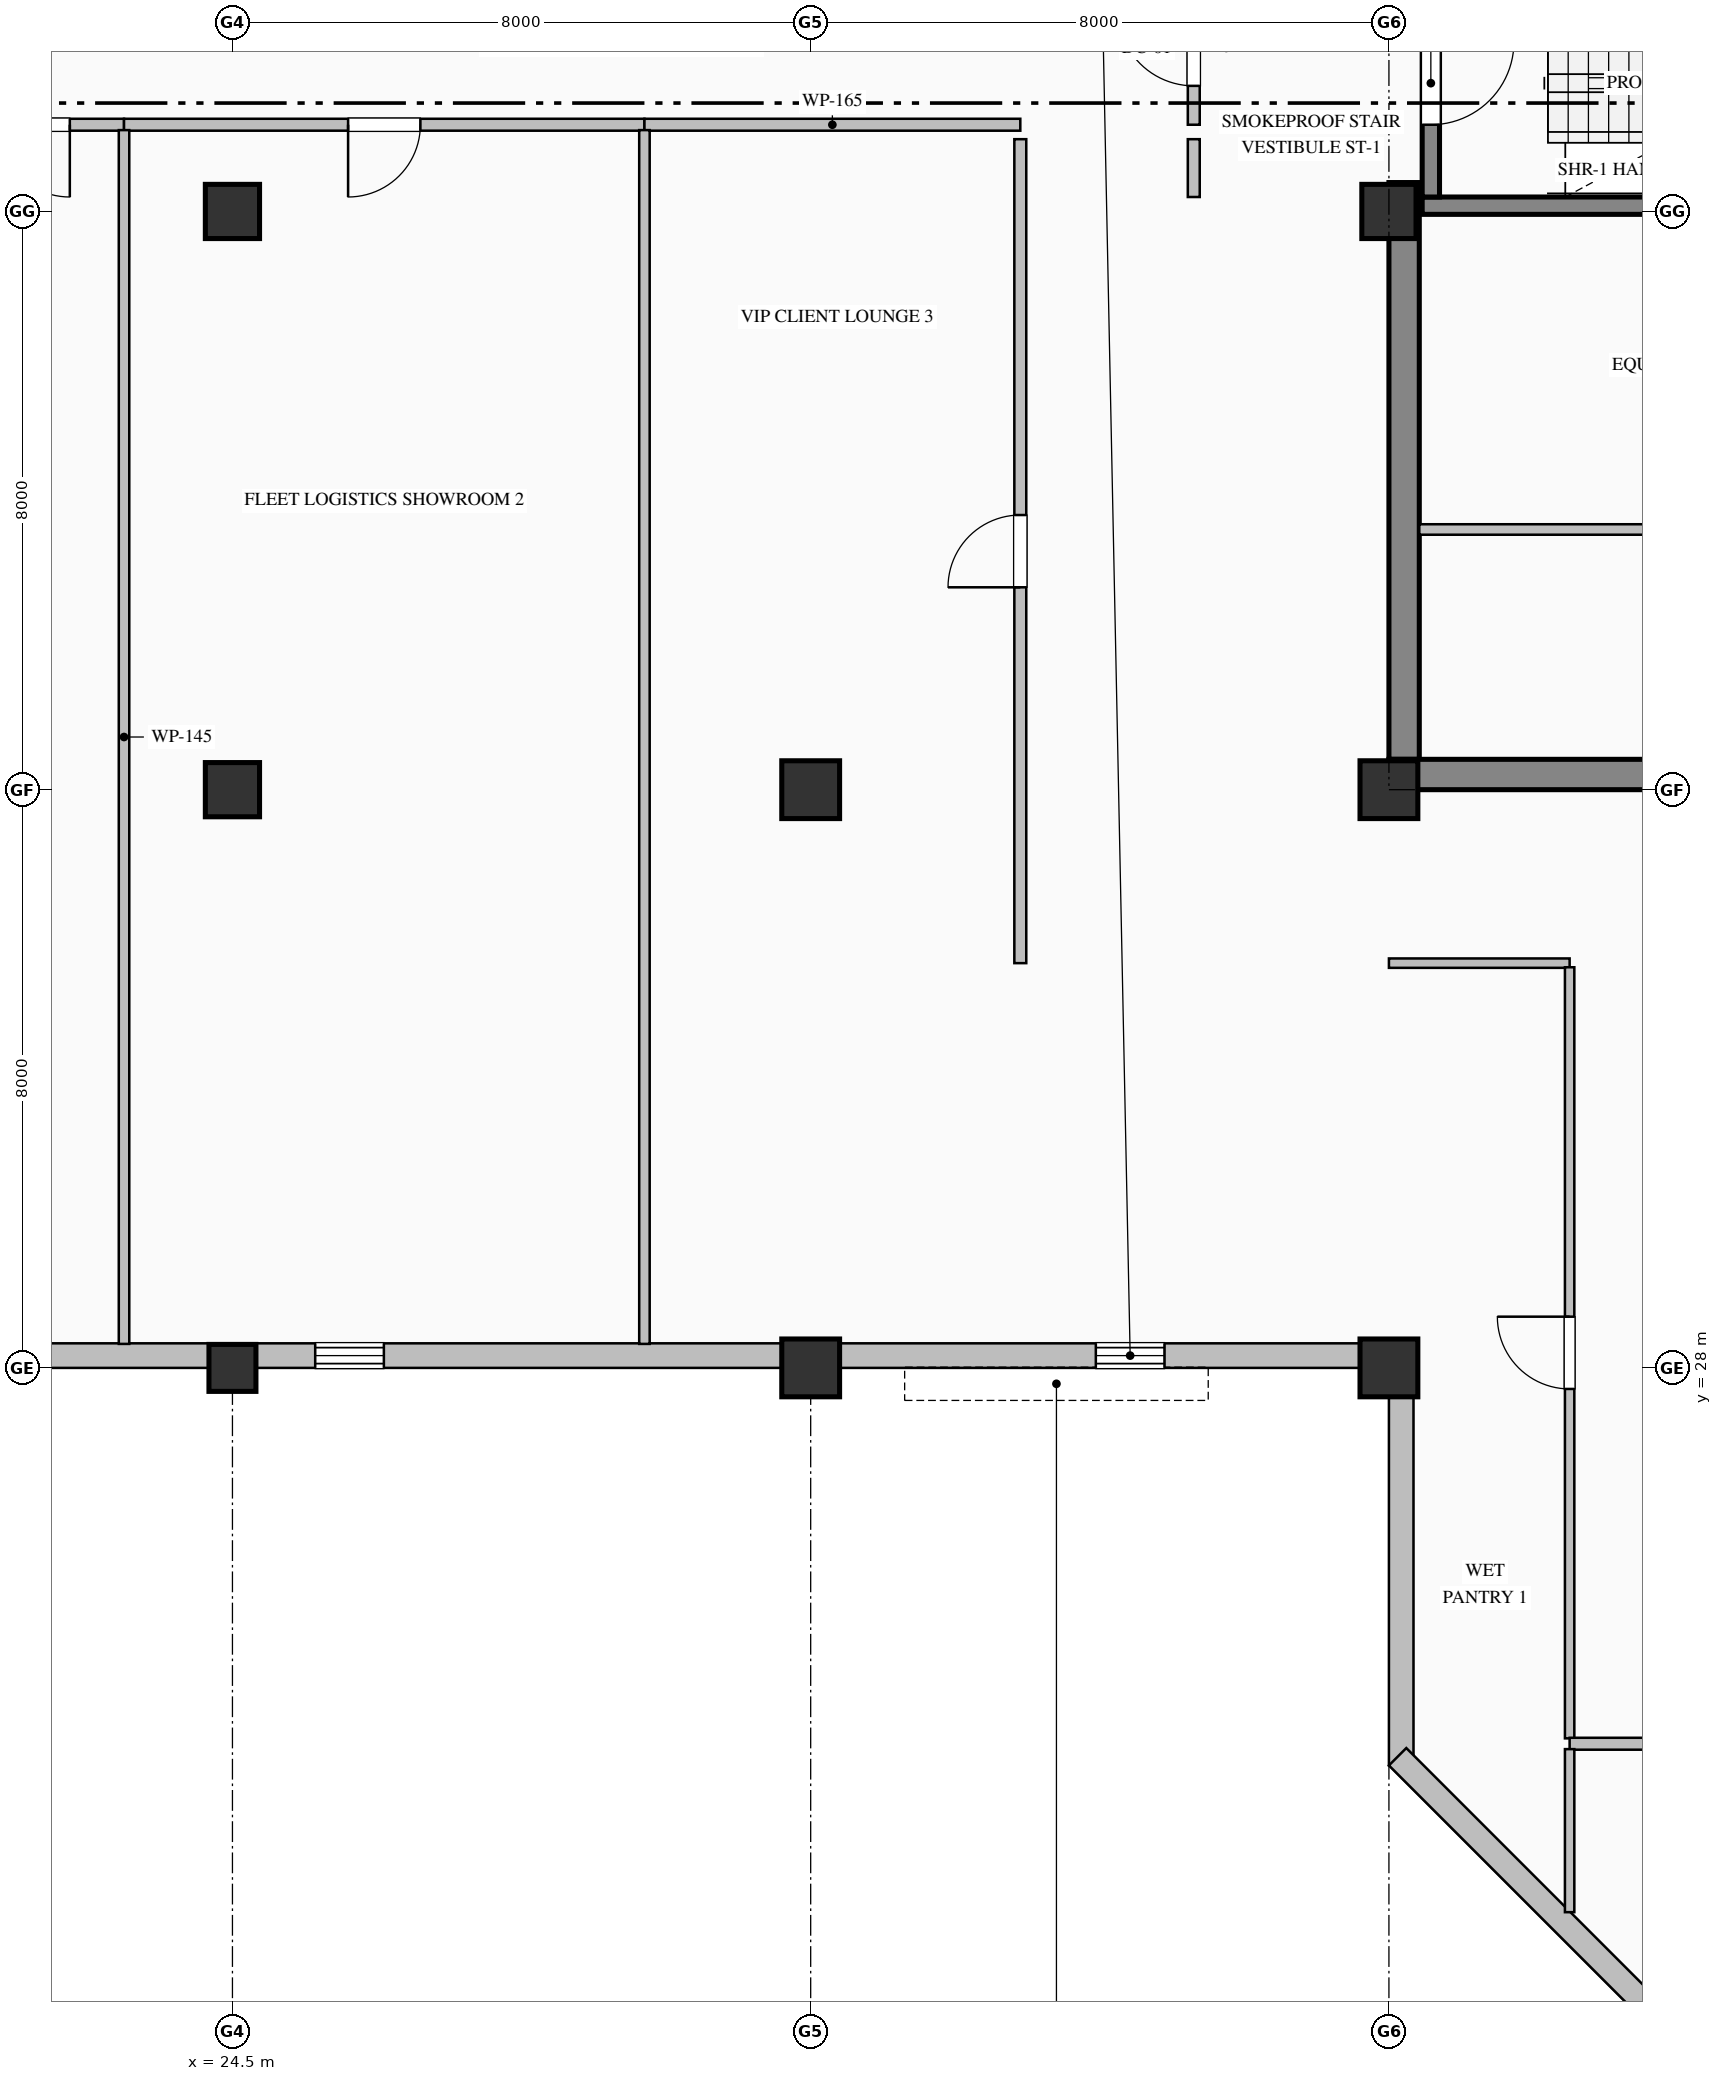
"""IFC4 building model, lengths in metres.
Left out: names, types, materials, properties, quantities, classifications, styles, units other than length and angle.
Written with IfcOpenShell. Run it as: python <this file> out.ifc"""

import sys

from ifc_helpers import new_model, si_unit, direction, frame, frame_2d, origin, origin_2d, place, context, subcontext, project, spatial, rectangle, hollow_rectangle, extrude, element, fill, save


model = new_model("IFC4")
c1 = context("Model", 3, precision=1e-05, world=origin(), true_north=direction((0.0, 1.0)))
c2 = subcontext(c1, "Body", "Model", "MODEL_VIEW")
j1 = project(units=[si_unit("LENGTHUNIT", "METRE"), si_unit("PLANEANGLEUNIT", "RADIAN")], contexts=[c1])
p1 = place(None, origin())
s1 = spatial("IfcSite", under=j1, at=p1, CompositionType="ELEMENT")
p2 = place(p1, origin())
s2 = spatial("IfcBuilding", under=s1, at=p2, CompositionType="ELEMENT")
p3 = place(p2, frame((0.0, 0.0, 355.2)))
s3 = spatial("IfcBuildingStorey", under=s2, at=p3, CompositionType="ELEMENT", Elevation=355.2)
p4 = place(p3, frame((40.71, 36.42, 0.0), z_axis=(0.0, 0.0, 1.0), x_axis=(0.0, 1.0, 0.0)))
e1 = element("IfcWall", 1, at=p4, inside=s3, PredefinedType="SHEAR", context=c2, shape_type="SweptSolid", body=[
    extrude(rectangle(XDim=7.98, YDim=0.42, at=frame_2d((3.99, 0.0))), origin(), (0.0, 0.0, 1.0), 3.785),
])
p5 = place(p3, frame((40.5, 36.21, 0.0), z_axis=(0.0, 0.0, 1.0), x_axis=(1.0, 0.0, 0.0)))
e2 = element("IfcWall", 2, at=p5, inside=s3, PredefinedType="SHEAR", context=c2, shape_type="SweptSolid", body=[
    extrude(rectangle(XDim=9.1, YDim=0.42, at=frame_2d((4.55, 0.0))), origin(), (0.0, 0.0, 1.0), 3.785),
])
p6 = place(p3, frame((24.5, 28.0, 0.0), z_axis=(0.0, 0.0, 1.0), x_axis=(1.0, 0.0, 0.0)))
e3 = element("IfcColumn", 3, at=p6, inside=s3, PredefinedType="COLUMN", context=c2, shape_type="SweptSolid", body=[
    extrude(hollow_rectangle(XDim=0.65, YDim=0.65, WallThickness=0.028, at=origin_2d()), origin(), (0.0, 0.0, 1.0), 4.0),
])
for number, where, z_axis, x_axis in (
    (4, (24.5, 36.0, 0.0), (0.0, 0.0, 1.0), (1.0, 0.0, 0.0)),
    (5, (24.5, 44.0, 0.0), (0.0, 0.0, 1.0), (1.0, 0.0, 0.0)),
):
    element("IfcColumn", number, at=place(p3, frame(where, z_axis=z_axis, x_axis=x_axis)), inside=s3, PredefinedType="COLUMN", context=c2, shape_type="SweptSolid", body=[
        extrude(rectangle(XDim=0.75, YDim=0.75, at=origin_2d()), origin(), (0.0, 0.0, 1.0), 4.0),
    ])
for number, where, z_axis, x_axis in (
    (6, (32.5, 28.0, 0.0), (0.0, 0.0, 1.0), (1.0, 0.0, 0.0)),
    (7, (32.5, 36.0, 0.0), (0.0, 0.0, 1.0), (1.0, 0.0, 0.0)),
    (8, (40.5, 28.0, 0.0), (0.0, 0.0, 1.0), (1.0, 0.0, 0.0)),
    (9, (40.5, 36.0, 0.0), (0.0, 0.0, 1.0), (1.0, 0.0, 0.0)),
):
    element("IfcColumn", number, at=place(p3, frame(where, z_axis=z_axis, x_axis=x_axis)), inside=s3, PredefinedType="COLUMN", context=c2, shape_type="SweptSolid", body=[
        extrude(hollow_rectangle(XDim=0.8, YDim=0.8, WallThickness=0.032, at=origin_2d()), origin(), (0.0, 0.0, 1.0), 4.0),
    ])
p7 = place(p3, frame((40.5, 44.0, 0.0), z_axis=(0.0, 0.0, 1.0), x_axis=(1.0, 0.0, 0.0)))
e10 = element("IfcColumn", 10, at=p7, inside=s3, PredefinedType="COLUMN", context=c2, shape_type="SweptSolid", body=[
    extrude(rectangle(XDim=0.75, YDim=0.75, at=origin_2d()), origin(), (0.0, 0.0, 1.0), 4.0),
])
p8 = place(p3, frame((40.67, 22.5, 0.0), z_axis=(0.0, 0.0, 1.0), x_axis=(0.0, 1.0, 0.0)))
e11 = element("IfcWall", 11, at=p8, inside=s3, PredefinedType="SOLIDWALL", context=c2, shape_type="SweptSolid", body=[
    extrude(rectangle(XDim=5.84, YDim=0.34, at=frame_2d((2.92, 0.0))), origin(), (0.0, 0.0, 1.0), 3.185),
])
p9 = place(p3, frame((40.52, 28.17, 0.0), z_axis=(0.0, 0.0, 1.0), x_axis=(-1.0, 0.0, 0.0)))
e12 = element("IfcWall", 12, at=p9, inside=s3, PredefinedType="SOLIDWALL", context=c2, shape_type="SweptSolid", body=[
    extrude(rectangle(XDim=20.02, YDim=0.34, at=frame_2d((10.01, 0.0))), origin(), (0.0, 0.0, 1.0), 3.185),
])
p10 = place(p9, frame((3.125, 0.0, 0.9)))
e13 = element("IfcOpeningElement", 13, at=p10, cuts=e12, PredefinedType="OPENING", context=c2, shape_type="SweptSolid", body=[
    extrude(rectangle(XDim=0.95, YDim=1.85, at=frame_2d((0.475, 0.925))), frame((0.0, 0.18, 0.0), z_axis=(0.0, -1.0, 0.0), x_axis=(1.0, 0.0, 0.0)), (0.0, 0.0, 1.0), 0.36),
])
p11 = place(p9, frame((13.925, 0.0, 0.9)))
e14 = element("IfcOpeningElement", 14, at=p11, cuts=e12, PredefinedType="OPENING", context=c2, shape_type="SweptSolid", body=[
    extrude(rectangle(XDim=0.95, YDim=1.85, at=frame_2d((0.475, 0.925))), frame((0.0, 0.18, 0.0), z_axis=(0.0, -1.0, 0.0), x_axis=(1.0, 0.0, 0.0)), (0.0, 0.0, 1.0), 0.36),
])
p12 = place(p3, frame((44.62, 18.62, 0.0), z_axis=(0.0, 0.0, 1.0), x_axis=(-0.707106781187, 0.707106781187, 0.0)))
e15 = element("IfcWall", 15, at=p12, inside=s3, PredefinedType="SOLIDWALL", context=c2, shape_type="SweptSolid", body=[
    extrude(rectangle(XDim=5.657, YDim=0.34, at=frame_2d((2.828, 0.0))), origin(), (0.0, 0.0, 1.0), 3.785),
])
p13 = place(p3, frame((49.04, 44.08, 0.0), z_axis=(0.0, 0.0, 1.0), x_axis=(-1.0, 0.0, 0.0)))
e16 = element("IfcWall", 16, at=p13, inside=s3, PredefinedType="SOLIDWALL", context=c2, shape_type="SweptSolid", body=[
    extrude(rectangle(XDim=8.08, YDim=0.24, at=frame_2d((4.04, 0.0))), origin(), (0.0, 0.0, 1.0), 4.0),
])
p14 = place(p3, frame((41.08, 47.35, 0.0), z_axis=(0.0, 0.0, 1.0), x_axis=(0.0, -1.0, 0.0)))
e17 = element("IfcWall", 17, at=p14, inside=s3, PredefinedType="SOLIDWALL", context=c2, shape_type="SweptSolid", body=[
    extrude(rectangle(XDim=3.15, YDim=0.24, at=frame_2d((1.575, 0.0))), origin(), (0.0, 0.0, 1.0), 4.0),
])
p15 = place(p14, frame((1.0, 0.0, 0.0)))
e18 = element("IfcOpeningElement", 18, at=p15, cuts=e17, PredefinedType="OPENING", context=c2, shape_type="SweptSolid", body=[
    extrude(rectangle(XDim=1.15, YDim=2.2, at=frame_2d((0.575, 1.1))), frame((0.0, 0.13, 0.0), z_axis=(0.0, -1.0, 0.0), x_axis=(1.0, 0.0, 0.0)), (0.0, 0.0, 1.0), 0.26),
])
p16 = place(p3, frame((37.8, 45.2, 0.0), z_axis=(0.0, 0.0, 1.0), x_axis=(0.0, 1.0, 0.0)))
e19 = element("IfcWall", 19, at=p16, inside=s3, PredefinedType="PARTITIONING", context=c2, shape_type="SweptSolid", body=[
    extrude(rectangle(XDim=2.125, YDim=0.165, at=frame_2d((1.063, 0.0))), origin(), (0.0, 0.0, 1.0), 3.785),
])
p17 = place(p16, frame((0.538, 0.0, 0.0)))
e20 = element("IfcOpeningElement", 20, at=p17, cuts=e19, PredefinedType="OPENING", context=c2, shape_type="SweptSolid", body=[
    extrude(rectangle(XDim=1.05, YDim=2.15, at=frame_2d((0.525, 1.075))), frame((0.0, 0.093, 0.0), z_axis=(0.0, -1.0, 0.0), x_axis=(1.0, 0.0, 0.0)), (0.0, 0.0, 1.0), 0.185),
])
p18 = place(p3, frame((37.8, 44.2, 0.0), z_axis=(0.0, 0.0, 1.0), x_axis=(0.0, 1.0, 0.0)))
e21 = element("IfcWall", 21, at=p18, inside=s3, PredefinedType="PARTITIONING", context=c2, shape_type="SweptSolid", body=[
    extrude(rectangle(XDim=0.8, YDim=0.165, at=frame_2d((0.4, 0.0))), origin(), (0.0, 0.0, 1.0), 3.785),
])
p19 = place(p3, frame((40.92, 39.6, 0.0), z_axis=(0.0, 0.0, 1.0), x_axis=(1.0, 0.0, 0.0)))
e22 = element("IfcWall", 22, at=p19, inside=s3, PredefinedType="PARTITIONING", context=c2, shape_type="SweptSolid", body=[
    extrude(rectangle(XDim=8.48, YDim=0.145, at=frame_2d((4.24, 0.0))), origin(), (0.0, 0.0, 1.0), 3.785),
])
p20 = place(p3, frame((23.0, 45.2, 0.0), z_axis=(0.0, 0.0, 1.0), x_axis=(-1.0, 0.0, 0.0)))
e23 = element("IfcWall", 23, at=p20, inside=s3, PredefinedType="PARTITIONING", context=c2, shape_type="SweptSolid", body=[
    extrude(rectangle(XDim=2.5, YDim=0.165, at=frame_2d((1.25, 0.0))), origin(), (0.0, 0.0, 1.0), 3.785),
])
p21 = place(p20, frame((0.75, 0.0, 0.0)))
e24 = element("IfcOpeningElement", 24, at=p21, cuts=e23, PredefinedType="OPENING", context=c2, shape_type="SweptSolid", body=[
    extrude(rectangle(XDim=1.0, YDim=2.15, at=frame_2d((0.5, 1.075))), frame((0.0, 0.093, 0.0), z_axis=(0.0, -1.0, 0.0), x_axis=(1.0, 0.0, 0.0)), (0.0, 0.0, 1.0), 0.185),
])
p22 = place(p3, frame((30.2, 45.2, 0.0), z_axis=(0.0, 0.0, 1.0), x_axis=(-1.0, 0.0, 0.0)))
e25 = element("IfcWall", 25, at=p22, inside=s3, PredefinedType="PARTITIONING", context=c2, shape_type="SweptSolid", body=[
    extrude(rectangle(XDim=7.2, YDim=0.165, at=frame_2d((3.6, 0.0))), origin(), (0.0, 0.0, 1.0), 3.785),
])
p23 = place(p22, frame((3.1, 0.0, 0.0)))
e26 = element("IfcOpeningElement", 26, at=p23, cuts=e25, PredefinedType="OPENING", context=c2, shape_type="SweptSolid", body=[
    extrude(rectangle(XDim=1.0, YDim=2.15, at=frame_2d((0.5, 1.075))), frame((0.0, 0.093, 0.0), z_axis=(0.0, -1.0, 0.0), x_axis=(1.0, 0.0, 0.0)), (0.0, 0.0, 1.0), 0.185),
])
p24 = place(p3, frame((35.4, 45.2, 0.0), z_axis=(0.0, 0.0, 1.0), x_axis=(-1.0, 0.0, 0.0)))
e27 = element("IfcWall", 27, at=p24, inside=s3, PredefinedType="PARTITIONING", context=c2, shape_type="SweptSolid", body=[
    extrude(rectangle(XDim=5.2, YDim=0.165, at=frame_2d((2.6, 0.0))), origin(), (0.0, 0.0, 1.0), 3.785),
])
p25 = place(p3, frame((35.4, 33.6, 0.0), z_axis=(0.0, 0.0, 1.0), x_axis=(0.0, 1.0, 0.0)))
e28 = element("IfcWall", 28, at=p25, inside=s3, PredefinedType="PARTITIONING", context=c2, shape_type="SweptSolid", body=[
    extrude(rectangle(XDim=11.4, YDim=0.165, at=frame_2d((5.7, 0.0))), origin(), (0.0, 0.0, 1.0), 3.785),
])
p26 = place(p25, frame((5.2, 0.0, 0.0)))
e29 = element("IfcOpeningElement", 29, at=p26, cuts=e28, PredefinedType="OPENING", context=c2, shape_type="SweptSolid", body=[
    extrude(rectangle(XDim=1.0, YDim=2.15, at=frame_2d((0.5, 1.075))), frame((0.0, 0.093, 0.0), z_axis=(0.0, -1.0, 0.0), x_axis=(1.0, 0.0, 0.0)), (0.0, 0.0, 1.0), 0.185),
])
p27 = place(p3, frame((43.0, 33.6, 0.0), z_axis=(0.0, 0.0, 1.0), x_axis=(-1.0, 0.0, 0.0)))
e30 = element("IfcWall", 30, at=p27, inside=s3, PredefinedType="PARTITIONING", context=c2, shape_type="SweptSolid", body=[
    extrude(rectangle(XDim=2.5, YDim=0.13, at=frame_2d((1.25, 0.0))), origin(), (0.0, 0.0, 1.0), 3.785),
])
p28 = place(p3, frame((43.0, 22.875, 0.0), z_axis=(0.0, 0.0, 1.0), x_axis=(0.0, 1.0, 0.0)))
e31 = element("IfcWall", 31, at=p28, inside=s3, PredefinedType="PARTITIONING", context=c2, shape_type="SweptSolid", body=[
    extrude(rectangle(XDim=10.668, YDim=0.13, at=frame_2d((5.334, 0.0))), origin(), (0.0, 0.0, 1.0), 3.785),
])
p29 = place(p28, frame((4.834, 0.0, 0.0)))
e32 = element("IfcOpeningElement", 32, at=p29, cuts=e31, PredefinedType="OPENING", context=c2, shape_type="SweptSolid", body=[
    extrude(rectangle(XDim=1.0, YDim=2.15, at=frame_2d((0.5, 1.075))), frame((0.0, 0.075, 0.0), z_axis=(0.0, -1.0, 0.0), x_axis=(1.0, 0.0, 0.0)), (0.0, 0.0, 1.0), 0.15),
])
p30 = place(p3, frame((45.2, 22.8, 0.0), z_axis=(0.0, 0.0, 1.0), x_axis=(-1.0, 0.0, 0.0)))
e33 = element("IfcWall", 33, at=p30, inside=s3, PredefinedType="PARTITIONING", context=c2, shape_type="SweptSolid", body=[
    extrude(rectangle(XDim=2.2, YDim=0.165, at=frame_2d((1.1, 0.0))), origin(), (0.0, 0.0, 1.0), 3.785),
])
for number, where, z_axis, x_axis in (
    (34, (23.0, 45.125, 0.0), (0.0, 0.0, 1.0), (0.0, -1.0, 0.0)),
    (35, (30.2, 45.125, 0.0), (0.0, 0.0, 1.0), (0.0, -1.0, 0.0)),
):
    element("IfcWall", number, at=place(p3, frame(where, z_axis=z_axis, x_axis=x_axis)), inside=s3, PredefinedType="PARTITIONING", context=c2, shape_type="SweptSolid", body=[
        extrude(rectangle(XDim=16.793, YDim=0.145, at=frame_2d((8.397, 0.0))), origin(), (0.0, 0.0, 1.0), 3.785),
    ])
p31 = place(p3, frame((43.0, 22.726, 0.0), z_axis=(0.0, 0.0, 1.0), x_axis=(0.0, -1.0, 0.0)))
e36 = element("IfcWall", 36, at=p31, inside=s3, PredefinedType="PARTITIONING", context=c2, shape_type="SweptSolid", body=[
    extrude(rectangle(XDim=2.256, YDim=0.13, at=frame_2d((1.128, 0.0))), origin(), (0.0, 0.0, 1.0), 3.785),
])
p32 = place(p10, origin())
e37 = element("IfcWindow", 37, at=p32, inside=s3, PartitioningType="SINGLE_PANEL", PredefinedType="WINDOW", context=c2, shape_type="SweptSolid", body=[
    extrude(rectangle(XDim=0.95, YDim=1.85, at=frame_2d((0.475, 0.925))), frame((0.0, 0.15, 0.0), z_axis=(0.0, -1.0, 0.0), x_axis=(1.0, 0.0, 0.0)), (0.0, 0.0, 1.0), 0.06),
])
fill(e13, e37)
p33 = place(p11, origin())
e38 = element("IfcWindow", 38, at=p33, inside=s3, PartitioningType="SINGLE_PANEL", PredefinedType="WINDOW", context=c2, shape_type="SweptSolid", body=[
    extrude(rectangle(XDim=0.95, YDim=1.85, at=frame_2d((0.475, 0.925))), frame((0.0, 0.15, 0.0), z_axis=(0.0, -1.0, 0.0), x_axis=(1.0, 0.0, 0.0)), (0.0, 0.0, 1.0), 0.06),
])
fill(e14, e38)
p34 = place(p15, origin())
e39 = element("IfcDoor", 39, at=p34, inside=s3, OperationType="SINGLE_SWING_LEFT", PredefinedType="DOOR", context=c2, shape_type="SweptSolid", body=[
    extrude(rectangle(XDim=1.15, YDim=2.2, at=frame_2d((0.575, 1.1))), frame((0.0, 0.025, 0.0), z_axis=(0.0, -1.0, 0.0), x_axis=(1.0, 0.0, 0.0)), (0.0, 0.0, 1.0), 0.05),
])
fill(e18, e39)
p35 = place(p17, origin())
e40 = element("IfcDoor", 40, at=p35, inside=s3, OperationType="SINGLE_SWING_RIGHT", PredefinedType="DOOR", context=c2, shape_type="SweptSolid", body=[
    extrude(rectangle(XDim=1.05, YDim=2.15, at=frame_2d((0.525, 1.075))), frame((0.0, 0.025, 0.0), z_axis=(0.0, -1.0, 0.0), x_axis=(1.0, 0.0, 0.0)), (0.0, 0.0, 1.0), 0.05),
])
fill(e20, e40)
p36 = place(p21, origin())
e41 = element("IfcDoor", 41, at=p36, inside=s3, OperationType="SINGLE_SWING_LEFT", PredefinedType="DOOR", context=c2, shape_type="SweptSolid", body=[
    extrude(rectangle(XDim=1.0, YDim=2.15, at=frame_2d((0.5, 1.075))), frame((0.0, 0.025, 0.0), z_axis=(0.0, -1.0, 0.0), x_axis=(1.0, 0.0, 0.0)), (0.0, 0.0, 1.0), 0.05),
])
fill(e24, e41)
p37 = place(p23, origin())
e42 = element("IfcDoor", 42, at=p37, inside=s3, OperationType="SINGLE_SWING_RIGHT", PredefinedType="DOOR", context=c2, shape_type="SweptSolid", body=[
    extrude(rectangle(XDim=1.0, YDim=2.15, at=frame_2d((0.5, 1.075))), frame((0.0, 0.025, 0.0), z_axis=(0.0, -1.0, 0.0), x_axis=(1.0, 0.0, 0.0)), (0.0, 0.0, 1.0), 0.05),
])
fill(e26, e42)
p38 = place(p26, origin())
e43 = element("IfcDoor", 43, at=p38, inside=s3, OperationType="SINGLE_SWING_LEFT", PredefinedType="DOOR", context=c2, shape_type="SweptSolid", body=[
    extrude(rectangle(XDim=1.0, YDim=2.15, at=frame_2d((0.5, 1.075))), frame((0.0, 0.025, 0.0), z_axis=(0.0, -1.0, 0.0), x_axis=(1.0, 0.0, 0.0)), (0.0, 0.0, 1.0), 0.05),
])
fill(e29, e43)
p39 = place(p29, origin())
e44 = element("IfcDoor", 44, at=p39, inside=s3, OperationType="SINGLE_SWING_RIGHT", PredefinedType="DOOR", context=c2, shape_type="SweptSolid", body=[
    extrude(rectangle(XDim=1.0, YDim=2.15, at=frame_2d((0.5, 1.075))), frame((0.0, 0.025, 0.0), z_axis=(0.0, -1.0, 0.0), x_axis=(1.0, 0.0, 0.0)), (0.0, 0.0, 1.0), 0.05),
])
fill(e32, e44)
save(model, sys.argv[1])
